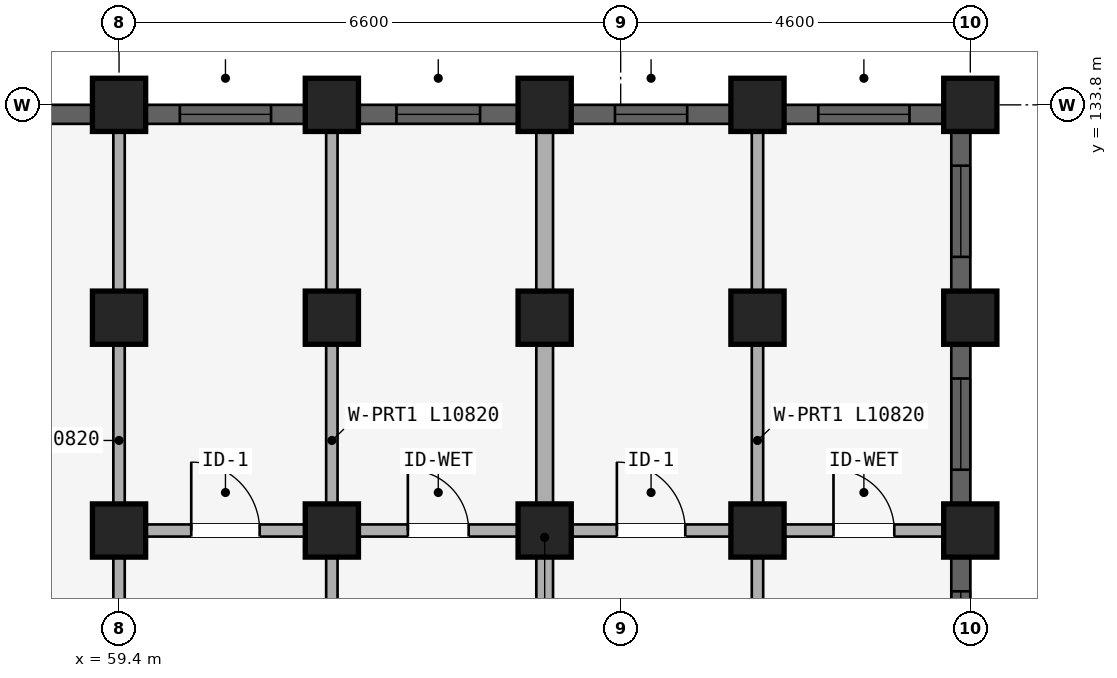
"""IFC4 building model, lengths in metres.
Left out: names, types, materials, properties, quantities, classifications, styles, units other than length and angle.
Written with IfcOpenShell. Run it as: python <this file> out.ifc"""

import sys

from ifc_helpers import new_model, si_unit, direction, frame, frame_2d, origin, origin_2d, place, context, subcontext, project, spatial, rectangle, extrude, element, fill, save


model = new_model("IFC4")
c1 = context("Model", 3, precision=1e-05, world=origin(), true_north=direction((0.0, 1.0)))
c2 = subcontext(c1, "Body", "Model", "MODEL_VIEW")
j1 = project(units=[si_unit("LENGTHUNIT", "METRE"), si_unit("PLANEANGLEUNIT", "RADIAN")], contexts=[c1])
p1 = place(None, origin())
s1 = spatial("IfcSite", under=j1, at=p1, CompositionType="ELEMENT")
p2 = place(p1, origin())
s2 = spatial("IfcBuilding", under=s1, at=p2, CompositionType="ELEMENT")
p3 = place(p2, frame((0.0, 0.0, 21.3)))
s3 = spatial("IfcBuildingStorey", under=s2, at=p3, CompositionType="ELEMENT", Elevation=21.3)
for number, where, z_axis, x_axis in (
    (1, (59.4, 128.2, 0.0), (0.0, 0.0, 1.0), (1.0, 0.0, 0.0)),
    (2, (59.4, 131.0, 0.0), (0.0, 0.0, 1.0), (1.0, 0.0, 0.0)),
    (3, (59.4, 133.8, 0.0), (0.0, 0.0, 1.0), (1.0, 0.0, 0.0)),
    (4, (62.2, 128.2, 0.0), (0.0, 0.0, 1.0), (1.0, 0.0, 0.0)),
    (5, (62.2, 131.0, 0.0), (0.0, 0.0, 1.0), (1.0, 0.0, 0.0)),
    (6, (62.2, 133.8, 0.0), (0.0, 0.0, 1.0), (1.0, 0.0, 0.0)),
    (7, (65.0, 128.2, 0.0), (0.0, 0.0, 1.0), (1.0, 0.0, 0.0)),
    (8, (65.0, 131.0, 0.0), (0.0, 0.0, 1.0), (1.0, 0.0, 0.0)),
    (9, (65.0, 133.8, 0.0), (0.0, 0.0, 1.0), (1.0, 0.0, 0.0)),
    (10, (67.8, 128.2, 0.0), (0.0, 0.0, 1.0), (1.0, 0.0, 0.0)),
    (11, (67.8, 131.0, 0.0), (0.0, 0.0, 1.0), (1.0, 0.0, 0.0)),
    (12, (67.8, 133.8, 0.0), (0.0, 0.0, 1.0), (1.0, 0.0, 0.0)),
    (13, (70.6, 128.2, 0.0), (0.0, 0.0, 1.0), (1.0, 0.0, 0.0)),
    (14, (70.6, 131.0, 0.0), (0.0, 0.0, 1.0), (1.0, 0.0, 0.0)),
    (15, (70.6, 133.8, 0.0), (0.0, 0.0, 1.0), (1.0, 0.0, 0.0)),
):
    element("IfcColumn", number, at=place(p3, frame(where, z_axis=z_axis, x_axis=x_axis)), inside=s3, PredefinedType="COLUMN", context=c2, shape_type="SweptSolid", body=[
        extrude(rectangle(XDim=0.7, YDim=0.7, at=origin_2d()), origin(), (0.0, 0.0, 1.0), 2.93),
    ])
p4 = place(p3, frame((59.48, 128.2, 0.0), z_axis=(0.0, 0.0, 1.0), x_axis=(1.0, 0.0, 0.0)))
e16 = element("IfcWall", 16, at=p4, inside=s3, PredefinedType="PLUMBINGWALL", context=c2, shape_type="SweptSolid", body=[
    extrude(rectangle(XDim=2.64, YDim=0.16, at=frame_2d((1.32, 0.0))), origin(), (0.0, 0.0, 1.0), 2.372),
])
p5 = place(p4, frame((0.87, 0.0, 0.0)))
e17 = element("IfcOpeningElement", 17, at=p5, cuts=e16, PredefinedType="OPENING", context=c2, shape_type="SweptSolid", body=[
    extrude(rectangle(XDim=0.9, YDim=2.1, at=frame_2d((0.45, 1.05))), frame((0.0, 0.09, 0.0), z_axis=(0.0, -1.0, 0.0), x_axis=(1.0, 0.0, 0.0)), (0.0, 0.0, 1.0), 0.18),
])
p6 = place(p3, frame((62.28, 128.2, 0.0), z_axis=(0.0, 0.0, 1.0), x_axis=(1.0, 0.0, 0.0)))
e18 = element("IfcWall", 18, at=p6, inside=s3, PredefinedType="PLUMBINGWALL", context=c2, shape_type="SweptSolid", body=[
    extrude(rectangle(XDim=2.64, YDim=0.16, at=frame_2d((1.32, 0.0))), origin(), (0.0, 0.0, 1.0), 2.372),
])
p7 = place(p6, frame((0.92, 0.0, 0.0)))
e19 = element("IfcOpeningElement", 19, at=p7, cuts=e18, PredefinedType="OPENING", context=c2, shape_type="SweptSolid", body=[
    extrude(rectangle(XDim=0.8, YDim=2.1, at=frame_2d((0.4, 1.05))), frame((0.0, 0.09, 0.0), z_axis=(0.0, -1.0, 0.0), x_axis=(1.0, 0.0, 0.0)), (0.0, 0.0, 1.0), 0.18),
])
p8 = place(p3, frame((65.08, 128.2, 0.0), z_axis=(0.0, 0.0, 1.0), x_axis=(1.0, 0.0, 0.0)))
e20 = element("IfcWall", 20, at=p8, inside=s3, PredefinedType="PLUMBINGWALL", context=c2, shape_type="SweptSolid", body=[
    extrude(rectangle(XDim=2.64, YDim=0.16, at=frame_2d((1.32, 0.0))), origin(), (0.0, 0.0, 1.0), 2.372),
])
p9 = place(p8, frame((0.87, 0.0, 0.0)))
e21 = element("IfcOpeningElement", 21, at=p9, cuts=e20, PredefinedType="OPENING", context=c2, shape_type="SweptSolid", body=[
    extrude(rectangle(XDim=0.9, YDim=2.1, at=frame_2d((0.45, 1.05))), frame((0.0, 0.09, 0.0), z_axis=(0.0, -1.0, 0.0), x_axis=(1.0, 0.0, 0.0)), (0.0, 0.0, 1.0), 0.18),
])
p10 = place(p3, frame((67.88, 128.2, 0.0), z_axis=(0.0, 0.0, 1.0), x_axis=(1.0, 0.0, 0.0)))
e22 = element("IfcWall", 22, at=p10, inside=s3, PredefinedType="PLUMBINGWALL", context=c2, shape_type="SweptSolid", body=[
    extrude(rectangle(XDim=2.64, YDim=0.16, at=frame_2d((1.32, 0.0))), origin(), (0.0, 0.0, 1.0), 2.372),
])
p11 = place(p10, frame((0.92, 0.0, 0.0)))
e23 = element("IfcOpeningElement", 23, at=p11, cuts=e22, PredefinedType="OPENING", context=c2, shape_type="SweptSolid", body=[
    extrude(rectangle(XDim=0.8, YDim=2.1, at=frame_2d((0.4, 1.05))), frame((0.0, 0.09, 0.0), z_axis=(0.0, -1.0, 0.0), x_axis=(1.0, 0.0, 0.0)), (0.0, 0.0, 1.0), 0.18),
])
p12 = place(p3, frame((59.4, 122.7, 0.0), z_axis=(0.0, 0.0, 1.0), x_axis=(0.0, 1.0, 0.0)))
e24 = element("IfcWall", 24, at=p12, inside=s3, PredefinedType="PARTITIONING", context=c2, shape_type="SweptSolid", body=[
    extrude(rectangle(XDim=10.82, YDim=0.15, at=frame_2d((5.41, 0.0))), origin(), (0.0, 0.0, 1.0), 2.372),
])
p13 = place(p12, frame((0.899, 0.0, 0.0)))
e25 = element("IfcOpeningElement", 25, at=p13, cuts=e24, PredefinedType="OPENING", context=c2, shape_type="SweptSolid", body=[
    extrude(rectangle(XDim=0.8, YDim=2.1, at=frame_2d((0.4, 1.05))), frame((0.0, 0.085, 0.0), z_axis=(0.0, -1.0, 0.0), x_axis=(1.0, 0.0, 0.0)), (0.0, 0.0, 1.0), 0.17),
])
p14 = place(p3, frame((62.2, 122.7, 0.0), z_axis=(0.0, 0.0, 1.0), x_axis=(0.0, 1.0, 0.0)))
e26 = element("IfcWall", 26, at=p14, inside=s3, PredefinedType="PARTITIONING", context=c2, shape_type="SweptSolid", body=[
    extrude(rectangle(XDim=10.82, YDim=0.15, at=frame_2d((5.41, 0.0))), origin(), (0.0, 0.0, 1.0), 2.372),
])
p15 = place(p14, frame((0.899, 0.0, 0.0)))
e27 = element("IfcOpeningElement", 27, at=p15, cuts=e26, PredefinedType="OPENING", context=c2, shape_type="SweptSolid", body=[
    extrude(rectangle(XDim=0.8, YDim=2.1, at=frame_2d((0.4, 1.05))), frame((0.0, 0.085, 0.0), z_axis=(0.0, -1.0, 0.0), x_axis=(1.0, 0.0, 0.0)), (0.0, 0.0, 1.0), 0.17),
])
p16 = place(p3, frame((65.0, 122.7, 0.0), z_axis=(0.0, 0.0, 1.0), x_axis=(0.0, 1.0, 0.0)))
e28 = element("IfcWall", 28, at=p16, inside=s3, PredefinedType="STANDARD", context=c2, shape_type="SweptSolid", body=[
    extrude(rectangle(XDim=10.82, YDim=0.22, at=frame_2d((5.41, 0.0))), origin(), (0.0, 0.0, 1.0), 2.372),
])
p17 = place(p3, frame((67.8, 122.7, 0.0), z_axis=(0.0, 0.0, 1.0), x_axis=(0.0, 1.0, 0.0)))
e29 = element("IfcWall", 29, at=p17, inside=s3, PredefinedType="PARTITIONING", context=c2, shape_type="SweptSolid", body=[
    extrude(rectangle(XDim=10.82, YDim=0.15, at=frame_2d((5.41, 0.0))), origin(), (0.0, 0.0, 1.0), 2.372),
])
p18 = place(p17, frame((0.899, 0.0, 0.0)))
e30 = element("IfcOpeningElement", 30, at=p18, cuts=e29, PredefinedType="OPENING", context=c2, shape_type="SweptSolid", body=[
    extrude(rectangle(XDim=0.8, YDim=2.1, at=frame_2d((0.4, 1.05))), frame((0.0, 0.085, 0.0), z_axis=(0.0, -1.0, 0.0), x_axis=(1.0, 0.0, 0.0)), (0.0, 0.0, 1.0), 0.17),
])
p19 = place(p3, frame((54.154, 133.675, 0.0), z_axis=(0.0, 0.0, 1.0), x_axis=(1.0, 0.0, 0.0)))
e31 = element("IfcWall", 31, at=p19, inside=s3, PredefinedType="STANDARD", context=c2, shape_type="SweptSolid", body=[
    extrude(rectangle(XDim=4.893, YDim=0.25, at=frame_2d((2.446, 0.0))), origin(), (0.0, 0.0, 1.0), 2.472),
])
p20 = place(p19, frame((1.771, 0.0, 0.672)))
e32 = element("IfcOpeningElement", 32, at=p20, cuts=e31, PredefinedType="OPENING", context=c2, shape_type="SweptSolid", body=[
    extrude(rectangle(XDim=1.35, YDim=1.6, at=frame_2d((0.675, 0.8))), frame((0.0, 0.135, 0.0), z_axis=(0.0, -1.0, 0.0), x_axis=(1.0, 0.0, 0.0)), (0.0, 0.0, 1.0), 0.27),
])
p21 = place(p3, frame((59.753, 133.675, 0.0), z_axis=(0.0, 0.0, 1.0), x_axis=(1.0, 0.0, 0.0)))
e33 = element("IfcWall", 33, at=p21, inside=s3, PredefinedType="STANDARD", context=c2, shape_type="SweptSolid", body=[
    extrude(rectangle(XDim=2.093, YDim=0.25, at=frame_2d((1.046, 0.0))), origin(), (0.0, 0.0, 1.0), 2.472),
])
p22 = place(p21, frame((0.447, 0.0, 0.772)))
e34 = element("IfcOpeningElement", 34, at=p22, cuts=e33, PredefinedType="OPENING", context=c2, shape_type="SweptSolid", body=[
    extrude(rectangle(XDim=1.2, YDim=1.5, at=frame_2d((0.6, 0.75))), frame((0.0, 0.135, 0.0), z_axis=(0.0, -1.0, 0.0), x_axis=(1.0, 0.0, 0.0)), (0.0, 0.0, 1.0), 0.27),
])
p23 = place(p3, frame((62.553, 133.675, 0.0), z_axis=(0.0, 0.0, 1.0), x_axis=(1.0, 0.0, 0.0)))
e35 = element("IfcWall", 35, at=p23, inside=s3, PredefinedType="STANDARD", context=c2, shape_type="SweptSolid", body=[
    extrude(rectangle(XDim=2.093, YDim=0.25, at=frame_2d((1.046, 0.0))), origin(), (0.0, 0.0, 1.0), 2.472),
])
p24 = place(p23, frame((0.497, 0.0, 0.822)))
e36 = element("IfcOpeningElement", 36, at=p24, cuts=e35, PredefinedType="OPENING", context=c2, shape_type="SweptSolid", body=[
    extrude(rectangle(XDim=1.1, YDim=1.45, at=frame_2d((0.55, 0.725))), frame((0.0, 0.135, 0.0), z_axis=(0.0, -1.0, 0.0), x_axis=(1.0, 0.0, 0.0)), (0.0, 0.0, 1.0), 0.27),
])
p25 = place(p3, frame((65.354, 133.675, 0.0), z_axis=(0.0, 0.0, 1.0), x_axis=(1.0, 0.0, 0.0)))
e37 = element("IfcWall", 37, at=p25, inside=s3, PredefinedType="STANDARD", context=c2, shape_type="SweptSolid", body=[
    extrude(rectangle(XDim=2.093, YDim=0.25, at=frame_2d((1.046, 0.0))), origin(), (0.0, 0.0, 1.0), 2.472),
])
p26 = place(p25, frame((0.572, 0.0, 0.88)))
e38 = element("IfcOpeningElement", 38, at=p26, cuts=e37, PredefinedType="OPENING", context=c2, shape_type="SweptSolid", body=[
    extrude(rectangle(XDim=0.95, YDim=1.35, at=frame_2d((0.475, 0.675))), frame((0.0, 0.135, 0.0), z_axis=(0.0, -1.0, 0.0), x_axis=(1.0, 0.0, 0.0)), (0.0, 0.0, 1.0), 0.27),
])
p27 = place(p3, frame((68.154, 133.675, 0.0), z_axis=(0.0, 0.0, 1.0), x_axis=(1.0, 0.0, 0.0)))
e39 = element("IfcWall", 39, at=p27, inside=s3, PredefinedType="STANDARD", context=c2, shape_type="SweptSolid", body=[
    extrude(rectangle(XDim=2.093, YDim=0.25, at=frame_2d((1.046, 0.0))), origin(), (0.0, 0.0, 1.0), 2.472),
])
p28 = place(p27, frame((0.447, 0.0, 0.772)))
e40 = element("IfcOpeningElement", 40, at=p28, cuts=e39, PredefinedType="OPENING", context=c2, shape_type="SweptSolid", body=[
    extrude(rectangle(XDim=1.2, YDim=1.5, at=frame_2d((0.6, 0.75))), frame((0.0, 0.135, 0.0), z_axis=(0.0, -1.0, 0.0), x_axis=(1.0, 0.0, 0.0)), (0.0, 0.0, 1.0), 0.27),
])
p29 = place(p3, frame((70.475, 125.753, 0.0), z_axis=(0.0, 0.0, 1.0), x_axis=(0.0, 1.0, 0.0)))
e41 = element("IfcWall", 41, at=p29, inside=s3, PredefinedType="STANDARD", context=c2, shape_type="SweptSolid", body=[
    extrude(rectangle(XDim=2.093, YDim=0.25, at=frame_2d((1.046, 0.0))), origin(), (0.0, 0.0, 1.0), 2.372),
])
p30 = place(p29, frame((0.447, 0.0, 0.672)))
e42 = element("IfcOpeningElement", 42, at=p30, cuts=e41, PredefinedType="OPENING", context=c2, shape_type="SweptSolid", body=[
    extrude(rectangle(XDim=1.2, YDim=1.5, at=frame_2d((0.6, 0.75))), frame((0.0, 0.135, 0.0), z_axis=(0.0, -1.0, 0.0), x_axis=(1.0, 0.0, 0.0)), (0.0, 0.0, 1.0), 0.27),
])
p31 = place(p3, frame((70.475, 128.553, 0.0), z_axis=(0.0, 0.0, 1.0), x_axis=(0.0, 1.0, 0.0)))
e43 = element("IfcWall", 43, at=p31, inside=s3, PredefinedType="STANDARD", context=c2, shape_type="SweptSolid", body=[
    extrude(rectangle(XDim=2.093, YDim=0.25, at=frame_2d((1.046, 0.0))), origin(), (0.0, 0.0, 1.0), 2.372),
])
p32 = place(p31, frame((0.447, 0.0, 0.672)))
e44 = element("IfcOpeningElement", 44, at=p32, cuts=e43, PredefinedType="OPENING", context=c2, shape_type="SweptSolid", body=[
    extrude(rectangle(XDim=1.2, YDim=1.5, at=frame_2d((0.6, 0.75))), frame((0.0, 0.135, 0.0), z_axis=(0.0, -1.0, 0.0), x_axis=(1.0, 0.0, 0.0)), (0.0, 0.0, 1.0), 0.27),
])
p33 = place(p3, frame((70.475, 131.354, 0.0), z_axis=(0.0, 0.0, 1.0), x_axis=(0.0, 1.0, 0.0)))
e45 = element("IfcWall", 45, at=p33, inside=s3, PredefinedType="STANDARD", context=c2, shape_type="SweptSolid", body=[
    extrude(rectangle(XDim=2.093, YDim=0.25, at=frame_2d((1.046, 0.0))), origin(), (0.0, 0.0, 1.0), 2.372),
])
p34 = place(p33, frame((0.447, 0.0, 0.672)))
e46 = element("IfcOpeningElement", 46, at=p34, cuts=e45, PredefinedType="OPENING", context=c2, shape_type="SweptSolid", body=[
    extrude(rectangle(XDim=1.2, YDim=1.5, at=frame_2d((0.6, 0.75))), frame((0.0, 0.135, 0.0), z_axis=(0.0, -1.0, 0.0), x_axis=(1.0, 0.0, 0.0)), (0.0, 0.0, 1.0), 0.27),
])
p35 = place(p22, origin())
e47 = element("IfcWindow", 47, at=p35, inside=s3, PartitioningType="SINGLE_PANEL", PredefinedType="WINDOW", context=c2, shape_type="SweptSolid", body=[
    extrude(rectangle(XDim=1.2, YDim=1.5, at=frame_2d((0.6, 0.75))), frame((0.0, 0.03, 0.0), z_axis=(0.0, -1.0, 0.0), x_axis=(1.0, 0.0, 0.0)), (0.0, 0.0, 1.0), 0.06),
])
fill(e34, e47)
p36 = place(p24, origin())
e48 = element("IfcWindow", 48, at=p36, inside=s3, PartitioningType="SINGLE_PANEL", PredefinedType="WINDOW", context=c2, shape_type="SweptSolid", body=[
    extrude(rectangle(XDim=1.1, YDim=1.45, at=frame_2d((0.55, 0.725))), frame((0.0, 0.03, 0.0), z_axis=(0.0, -1.0, 0.0), x_axis=(1.0, 0.0, 0.0)), (0.0, 0.0, 1.0), 0.06),
])
fill(e36, e48)
p37 = place(p26, origin())
e49 = element("IfcWindow", 49, at=p37, inside=s3, PartitioningType="SINGLE_PANEL", PredefinedType="WINDOW", context=c2, shape_type="SweptSolid", body=[
    extrude(rectangle(XDim=0.95, YDim=1.35, at=frame_2d((0.475, 0.675))), frame((0.0, 0.03, 0.0), z_axis=(0.0, -1.0, 0.0), x_axis=(1.0, 0.0, 0.0)), (0.0, 0.0, 1.0), 0.06),
])
fill(e38, e49)
p38 = place(p28, origin())
e50 = element("IfcWindow", 50, at=p38, inside=s3, PartitioningType="SINGLE_PANEL", PredefinedType="WINDOW", context=c2, shape_type="SweptSolid", body=[
    extrude(rectangle(XDim=1.2, YDim=1.5, at=frame_2d((0.6, 0.75))), frame((0.0, 0.03, 0.0), z_axis=(0.0, -1.0, 0.0), x_axis=(1.0, 0.0, 0.0)), (0.0, 0.0, 1.0), 0.06),
])
fill(e40, e50)
p39 = place(p30, origin())
e51 = element("IfcWindow", 51, at=p39, inside=s3, PartitioningType="SINGLE_PANEL", PredefinedType="WINDOW", context=c2, shape_type="SweptSolid", body=[
    extrude(rectangle(XDim=1.2, YDim=1.5, at=frame_2d((0.6, 0.75))), frame((0.0, 0.03, 0.0), z_axis=(0.0, -1.0, 0.0), x_axis=(1.0, 0.0, 0.0)), (0.0, 0.0, 1.0), 0.06),
])
fill(e42, e51)
p40 = place(p32, origin())
e52 = element("IfcWindow", 52, at=p40, inside=s3, PartitioningType="SINGLE_PANEL", PredefinedType="WINDOW", context=c2, shape_type="SweptSolid", body=[
    extrude(rectangle(XDim=1.2, YDim=1.5, at=frame_2d((0.6, 0.75))), frame((0.0, 0.03, 0.0), z_axis=(0.0, -1.0, 0.0), x_axis=(1.0, 0.0, 0.0)), (0.0, 0.0, 1.0), 0.06),
])
fill(e44, e52)
p41 = place(p34, origin())
e53 = element("IfcWindow", 53, at=p41, inside=s3, PartitioningType="SINGLE_PANEL", PredefinedType="WINDOW", context=c2, shape_type="SweptSolid", body=[
    extrude(rectangle(XDim=1.2, YDim=1.5, at=frame_2d((0.6, 0.75))), frame((0.0, 0.03, 0.0), z_axis=(0.0, -1.0, 0.0), x_axis=(1.0, 0.0, 0.0)), (0.0, 0.0, 1.0), 0.06),
])
fill(e46, e53)
p42 = place(p5, frame((0.9, 0.0, 0.0), z_axis=(0.0, 0.0, 1.0), x_axis=(-1.0, 0.0, 0.0)))
e54 = element("IfcDoor", 54, at=p42, inside=s3, OperationType="SINGLE_SWING_RIGHT", PredefinedType="DOOR", context=c2, shape_type="SweptSolid", body=[
    extrude(rectangle(XDim=0.9, YDim=2.1, at=frame_2d((0.45, 1.05))), frame((0.0, 0.025, 0.0), z_axis=(0.0, -1.0, 0.0), x_axis=(1.0, 0.0, 0.0)), (0.0, 0.0, 1.0), 0.05),
])
fill(e17, e54)
p43 = place(p7, frame((0.8, 0.0, 0.0), z_axis=(0.0, 0.0, 1.0), x_axis=(-1.0, 0.0, 0.0)))
e55 = element("IfcDoor", 55, at=p43, inside=s3, OperationType="SINGLE_SWING_RIGHT", PredefinedType="DOOR", context=c2, shape_type="SweptSolid", body=[
    extrude(rectangle(XDim=0.8, YDim=2.1, at=frame_2d((0.4, 1.05))), frame((0.0, 0.025, 0.0), z_axis=(0.0, -1.0, 0.0), x_axis=(1.0, 0.0, 0.0)), (0.0, 0.0, 1.0), 0.05),
])
fill(e19, e55)
p44 = place(p9, frame((0.9, 0.0, 0.0), z_axis=(0.0, 0.0, 1.0), x_axis=(-1.0, 0.0, 0.0)))
e56 = element("IfcDoor", 56, at=p44, inside=s3, OperationType="SINGLE_SWING_RIGHT", PredefinedType="DOOR", context=c2, shape_type="SweptSolid", body=[
    extrude(rectangle(XDim=0.9, YDim=2.1, at=frame_2d((0.45, 1.05))), frame((0.0, 0.025, 0.0), z_axis=(0.0, -1.0, 0.0), x_axis=(1.0, 0.0, 0.0)), (0.0, 0.0, 1.0), 0.05),
])
fill(e21, e56)
p45 = place(p11, frame((0.8, 0.0, 0.0), z_axis=(0.0, 0.0, 1.0), x_axis=(-1.0, 0.0, 0.0)))
e57 = element("IfcDoor", 57, at=p45, inside=s3, OperationType="SINGLE_SWING_RIGHT", PredefinedType="DOOR", context=c2, shape_type="SweptSolid", body=[
    extrude(rectangle(XDim=0.8, YDim=2.1, at=frame_2d((0.4, 1.05))), frame((0.0, 0.025, 0.0), z_axis=(0.0, -1.0, 0.0), x_axis=(1.0, 0.0, 0.0)), (0.0, 0.0, 1.0), 0.05),
])
fill(e23, e57)
save(model, sys.argv[1])
